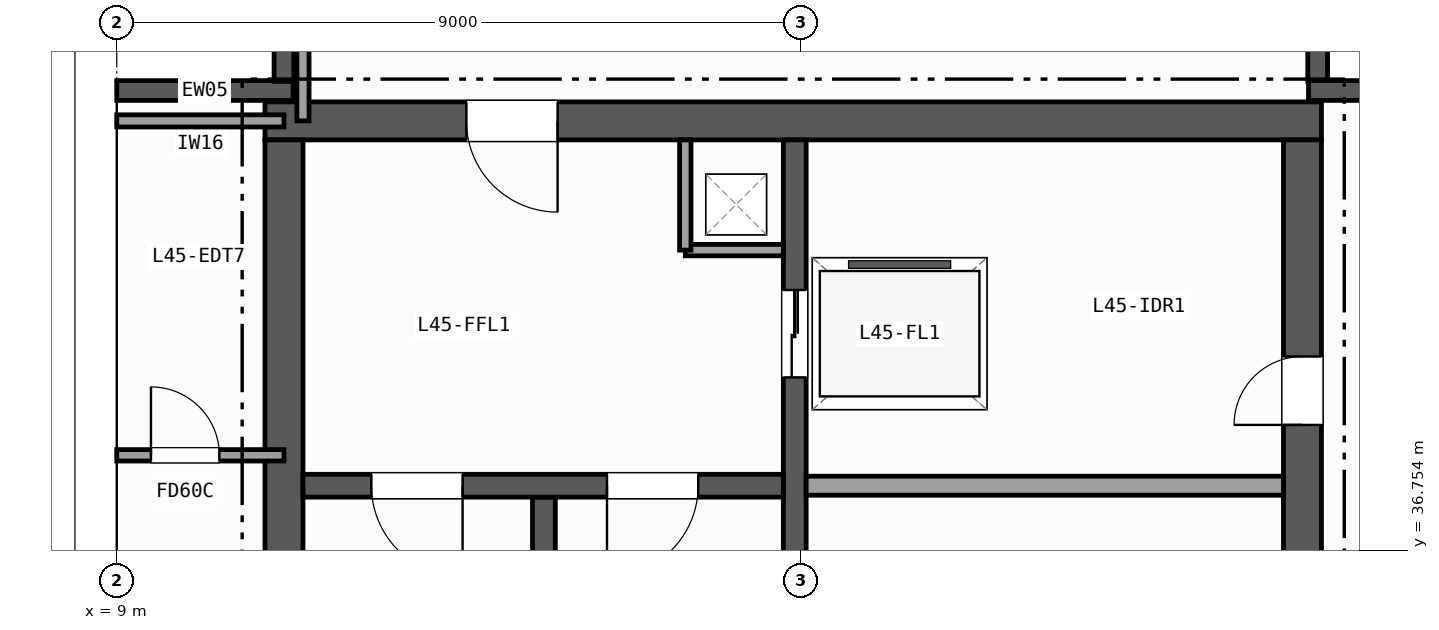
"""IFC4 building model, lengths in metres.
Left out: names, types, materials, properties, quantities, classifications, styles, units other than length and angle.
Written with IfcOpenShell. Run it as: python <this file> out.ifc"""

import sys

from ifc_helpers import new_model, si_unit, direction, frame, frame_2d, origin, place, context, subcontext, project, spatial, rectangle, extrude, element, fill, save


model = new_model("IFC4")
c1 = context("Model", 3, precision=1e-05, world=origin(), true_north=direction((0.0, 1.0)))
c2 = subcontext(c1, "Body", "Model", "MODEL_VIEW")
j1 = project(units=[si_unit("LENGTHUNIT", "METRE"), si_unit("PLANEANGLEUNIT", "RADIAN")], contexts=[c1])
p1 = place(None, origin())
s1 = spatial("IfcSite", under=j1, at=p1, CompositionType="ELEMENT")
p2 = place(p1, origin())
s2 = spatial("IfcBuilding", under=s1, at=p2, CompositionType="ELEMENT")
p3 = place(p2, frame((0.0, 0.0, 181.6)))
s3 = spatial("IfcBuildingStorey", under=s2, at=p3, CompositionType="ELEMENT", Elevation=181.6)
p4 = place(p3, frame((9.0, 42.8, 0.0), z_axis=(0.0, 0.0, 1.0), x_axis=(1.0, 0.0, 0.0)))
e1 = element("IfcWall", 1, at=p4, inside=s3, PredefinedType="SOLIDWALL", context=c2, shape_type="SweptSolid", body=[
    extrude(rectangle(XDim=2.32, YDim=0.26, at=frame_2d((1.16, 0.0))), origin(), (0.0, 0.0, 1.0), 3.42),
])
for number, where, z_axis, x_axis in (
    (2, (11.2, 42.92, 0.0), (0.0, 0.0, 1.0), (0.0, 1.0, 0.0)),
    (3, (24.8, 45.0, 0.0), (0.0, 0.0, 1.0), (0.0, -1.0, 0.0)),
):
    element("IfcWall", number, at=place(p3, frame(where, z_axis=z_axis, x_axis=x_axis)), inside=s3, PredefinedType="SOLIDWALL", context=c2, shape_type="SweptSolid", body=[
        extrude(rectangle(XDim=2.08, YDim=0.26, at=frame_2d((1.04, 0.0))), origin(), (0.0, 0.0, 1.0), 3.42),
    ])
p5 = place(p3, frame((24.68, 42.8, 0.0), z_axis=(0.0, 0.0, 1.0), x_axis=(1.0, 0.0, 0.0)))
e4 = element("IfcWall", 4, at=p5, inside=s3, PredefinedType="SOLIDWALL", context=c2, shape_type="SweptSolid", body=[
    extrude(rectangle(XDim=2.32, YDim=0.26, at=frame_2d((1.16, 0.0))), origin(), (0.0, 0.0, 1.0), 3.42),
])
p6 = place(p3, frame((24.85, 42.4, 0.0), z_axis=(0.0, 0.0, 1.0), x_axis=(-1.0, 0.0, 0.0)))
e5 = element("IfcWall", 5, at=p6, inside=s3, PredefinedType="SHEAR", context=c2, shape_type="SweptSolid", body=[
    extrude(rectangle(XDim=13.9, YDim=0.5, at=frame_2d((6.95, 0.0))), origin(), (0.0, 0.0, 1.0), 3.42),
])
p7 = place(p6, frame((10.05, 0.0, 0.0)))
e6 = element("IfcOpeningElement", 6, at=p7, cuts=e5, PredefinedType="OPENING", context=c2, shape_type="SweptSolid", body=[
    extrude(rectangle(XDim=1.2, YDim=2.15, at=frame_2d((0.6, 1.075))), frame((0.0, 0.26, 0.0), z_axis=(0.0, -1.0, 0.0), x_axis=(1.0, 0.0, 0.0)), (0.0, 0.0, 1.0), 0.52),
])
p8 = place(p3, frame((11.2, 42.15, 0.0), z_axis=(0.0, 0.0, 1.0), x_axis=(0.0, -1.0, 0.0)))
e7 = element("IfcWall", 7, at=p8, inside=s3, PredefinedType="SHEAR", context=c2, shape_type="SweptSolid", body=[
    extrude(rectangle(XDim=13.7, YDim=0.5, at=frame_2d((6.85, 0.0))), origin(), (0.0, 0.0, 1.0), 3.42),
])
p9 = place(p3, frame((24.6, 28.45, 0.0), z_axis=(0.0, 0.0, 1.0), x_axis=(0.0, 1.0, 0.0)))
e8 = element("IfcWall", 8, at=p9, inside=s3, PredefinedType="SHEAR", context=c2, shape_type="SweptSolid", body=[
    extrude(rectangle(XDim=13.7, YDim=0.5, at=frame_2d((6.85, 0.0))), origin(), (0.0, 0.0, 1.0), 3.42),
])
p10 = place(p9, frame((3.35, 0.0, 0.0)))
e9 = element("IfcOpeningElement", 9, at=p10, cuts=e8, PredefinedType="OPENING", context=c2, shape_type="SweptSolid", body=[
    extrude(rectangle(XDim=1.5, YDim=2.2, at=frame_2d((0.75, 1.1))), frame((0.0, 0.26, 0.0), z_axis=(0.0, -1.0, 0.0), x_axis=(1.0, 0.0, 0.0)), (0.0, 0.0, 1.0), 0.52),
])
p11 = place(p9, frame((9.95, 0.0, 0.0)))
e10 = element("IfcOpeningElement", 10, at=p11, cuts=e8, PredefinedType="OPENING", context=c2, shape_type="SweptSolid", body=[
    extrude(rectangle(XDim=0.9, YDim=2.1, at=frame_2d((0.45, 1.05))), frame((0.0, 0.26, 0.0), z_axis=(0.0, -1.0, 0.0), x_axis=(1.0, 0.0, 0.0)), (0.0, 0.0, 1.0), 0.52),
])
p12 = place(p3, frame((14.62, 28.45, 0.0), z_axis=(0.0, 0.0, 1.0), x_axis=(0.0, 1.0, 0.0)))
e11 = element("IfcWall", 11, at=p12, inside=s3, PredefinedType="SHEAR", context=c2, shape_type="SweptSolid", body=[
    extrude(rectangle(XDim=9.0, YDim=0.3, at=frame_2d((4.5, 0.0))), origin(), (0.0, 0.0, 1.0), 3.42),
])
p13 = place(p3, frame((17.92, 42.15, 0.0), z_axis=(0.0, 0.0, 1.0), x_axis=(0.0, -1.0, 0.0)))
e12 = element("IfcWall", 12, at=p13, inside=s3, PredefinedType="SHEAR", context=c2, shape_type="SweptSolid", body=[
    extrude(rectangle(XDim=13.7, YDim=0.3, at=frame_2d((6.85, 0.0))), origin(), (0.0, 0.0, 1.0), 3.42),
])
p14 = place(p13, frame((1.975, 0.0, 0.0)))
e13 = element("IfcOpeningElement", 13, at=p14, cuts=e12, PredefinedType="OPENING", context=c2, shape_type="SweptSolid", body=[
    extrude(rectangle(XDim=1.15, YDim=2.15, at=frame_2d((0.575, 1.075))), frame((0.0, 0.16, 0.0), z_axis=(0.0, -1.0, 0.0), x_axis=(1.0, 0.0, 0.0)), (0.0, 0.0, 1.0), 0.32),
])
p15 = place(p3, frame((17.77, 37.6, 0.0), z_axis=(0.0, 0.0, 1.0), x_axis=(-1.0, 0.0, 0.0)))
e14 = element("IfcWall", 14, at=p15, inside=s3, PredefinedType="SHEAR", context=c2, shape_type="SweptSolid", body=[
    extrude(rectangle(XDim=6.32, YDim=0.3, at=frame_2d((3.16, 0.0))), origin(), (0.0, 0.0, 1.0), 3.42),
])
p16 = place(p15, frame((4.22, 0.0, 0.0)))
e15 = element("IfcOpeningElement", 15, at=p16, cuts=e14, PredefinedType="OPENING", context=c2, shape_type="SweptSolid", body=[
    extrude(rectangle(XDim=1.2, YDim=2.15, at=frame_2d((0.6, 1.075))), frame((0.0, 0.16, 0.0), z_axis=(0.0, -1.0, 0.0), x_axis=(1.0, 0.0, 0.0)), (0.0, 0.0, 1.0), 0.32),
])
p17 = place(p15, frame((1.12, 0.0, 0.0)))
e16 = element("IfcOpeningElement", 16, at=p17, cuts=e14, PredefinedType="OPENING", context=c2, shape_type="SweptSolid", body=[
    extrude(rectangle(XDim=1.2, YDim=2.15, at=frame_2d((0.6, 1.075))), frame((0.0, 0.16, 0.0), z_axis=(0.0, -1.0, 0.0), x_axis=(1.0, 0.0, 0.0)), (0.0, 0.0, 1.0), 0.32),
])
p18 = place(p3, frame((16.48, 40.7, 0.0), z_axis=(0.0, 0.0, 1.0), x_axis=(1.0, 0.0, 0.0)))
e17 = element("IfcWall", 17, at=p18, inside=s3, PredefinedType="PARTITIONING", context=c2, shape_type="SweptSolid", body=[
    extrude(rectangle(XDim=1.29, YDim=0.15, at=frame_2d((0.645, 0.0))), origin(), (0.0, 0.0, 1.0), 3.42),
])
p19 = place(p3, frame((16.48, 40.7, 0.0), z_axis=(0.0, 0.0, 1.0), x_axis=(0.0, 1.0, 0.0)))
e18 = element("IfcWall", 18, at=p19, inside=s3, PredefinedType="PARTITIONING", context=c2, shape_type="SweptSolid", body=[
    extrude(rectangle(XDim=1.45, YDim=0.15, at=frame_2d((0.725, 0.0))), origin(), (0.0, 0.0, 1.0), 3.42),
])
p20 = place(p3, frame((18.07, 37.6, 0.0), z_axis=(0.0, 0.0, 1.0), x_axis=(1.0, 0.0, 0.0)))
e19 = element("IfcWall", 19, at=p20, inside=s3, PredefinedType="PARTITIONING", context=c2, shape_type="SweptSolid", body=[
    extrude(rectangle(XDim=6.28, YDim=0.25, at=frame_2d((3.14, 0.0))), origin(), (0.0, 0.0, 1.0), 3.42),
])
p21 = place(p3, frame((9.0, 42.4, 0.0), z_axis=(0.0, 0.0, 1.0), x_axis=(1.0, 0.0, 0.0)))
e20 = element("IfcWall", 20, at=p21, inside=s3, PredefinedType="PARTITIONING", context=c2, shape_type="SweptSolid", body=[
    extrude(rectangle(XDim=2.2, YDim=0.16, at=frame_2d((1.1, 0.0))), origin(), (0.0, 0.0, 1.0), 3.42),
])
p22 = place(p3, frame((11.45, 42.4, 0.0), z_axis=(0.0, 0.0, 1.0), x_axis=(0.0, 1.0, 0.0)))
e21 = element("IfcWall", 21, at=p22, inside=s3, PredefinedType="PARTITIONING", context=c2, shape_type="SweptSolid", body=[
    extrude(rectangle(XDim=2.666, YDim=0.16, at=frame_2d((1.333, 0.0))), origin(), (0.0, 0.0, 1.0), 3.42),
])
p23 = place(p3, frame((9.0, 38.0, 0.0), z_axis=(0.0, 0.0, 1.0), x_axis=(1.0, 0.0, 0.0)))
e22 = element("IfcWall", 22, at=p23, inside=s3, PredefinedType="PARTITIONING", context=c2, shape_type="SweptSolid", body=[
    extrude(rectangle(XDim=2.2, YDim=0.15, at=frame_2d((1.1, 0.0))), origin(), (0.0, 0.0, 1.0), 3.42),
])
p24 = place(p23, frame((0.45, 0.0, 0.0)))
e23 = element("IfcOpeningElement", 23, at=p24, cuts=e22, PredefinedType="OPENING", context=c2, shape_type="SweptSolid", body=[
    extrude(rectangle(XDim=0.9, YDim=2.1, at=frame_2d((0.45, 1.05))), frame((0.0, 0.085, 0.0), z_axis=(0.0, -1.0, 0.0), x_axis=(1.0, 0.0, 0.0)), (0.0, 0.0, 1.0), 0.17),
])
p25 = place(p16, origin())
e24 = element("IfcDoor", 24, at=p25, inside=s3, OperationType="SINGLE_SWING_LEFT", PredefinedType="DOOR", context=c2, shape_type="SweptSolid", body=[
    extrude(rectangle(XDim=1.2, YDim=2.15, at=frame_2d((0.6, 1.075))), frame((0.0, 0.025, 0.0), z_axis=(0.0, -1.0, 0.0), x_axis=(1.0, 0.0, 0.0)), (0.0, 0.0, 1.0), 0.05),
])
fill(e15, e24)
p26 = place(p17, origin())
e25 = element("IfcDoor", 25, at=p26, inside=s3, OperationType="SINGLE_SWING_RIGHT", PredefinedType="DOOR", context=c2, shape_type="SweptSolid", body=[
    extrude(rectangle(XDim=1.2, YDim=2.15, at=frame_2d((0.6, 1.075))), frame((0.0, 0.025, 0.0), z_axis=(0.0, -1.0, 0.0), x_axis=(1.0, 0.0, 0.0)), (0.0, 0.0, 1.0), 0.05),
])
fill(e16, e25)
p27 = place(p7, origin())
e26 = element("IfcDoor", 26, at=p27, inside=s3, OperationType="SINGLE_SWING_LEFT", PredefinedType="DOOR", context=c2, shape_type="SweptSolid", body=[
    extrude(rectangle(XDim=1.2, YDim=2.15, at=frame_2d((0.6, 1.075))), frame((0.0, 0.025, 0.0), z_axis=(0.0, -1.0, 0.0), x_axis=(1.0, 0.0, 0.0)), (0.0, 0.0, 1.0), 0.05),
])
fill(e6, e26)
p28 = place(p11, origin())
e27 = element("IfcDoor", 27, at=p28, inside=s3, OperationType="SINGLE_SWING_LEFT", PredefinedType="DOOR", context=c2, shape_type="SweptSolid", body=[
    extrude(rectangle(XDim=0.9, YDim=2.1, at=frame_2d((0.45, 1.05))), frame((0.0, 0.025, 0.0), z_axis=(0.0, -1.0, 0.0), x_axis=(1.0, 0.0, 0.0)), (0.0, 0.0, 1.0), 0.05),
])
fill(e10, e27)
p29 = place(p14, origin())
e28 = element("IfcDoor", 28, at=p29, inside=s3, OperationType="DOUBLE_DOOR_SLIDING", PredefinedType="DOOR", context=c2, shape_type="SweptSolid", body=[
    extrude(rectangle(XDim=1.15, YDim=2.15, at=frame_2d((0.575, 1.075))), frame((0.0, 0.025, 0.0), z_axis=(0.0, -1.0, 0.0), x_axis=(1.0, 0.0, 0.0)), (0.0, 0.0, 1.0), 0.05),
])
fill(e13, e28)
p30 = place(p24, origin())
e29 = element("IfcDoor", 29, at=p30, inside=s3, OperationType="SINGLE_SWING_LEFT", PredefinedType="DOOR", context=c2, shape_type="SweptSolid", body=[
    extrude(rectangle(XDim=0.9, YDim=2.1, at=frame_2d((0.45, 1.05))), frame((0.0, 0.025, 0.0), z_axis=(0.0, -1.0, 0.0), x_axis=(1.0, 0.0, 0.0)), (0.0, 0.0, 1.0), 0.05),
])
fill(e23, e29)
save(model, sys.argv[1])
